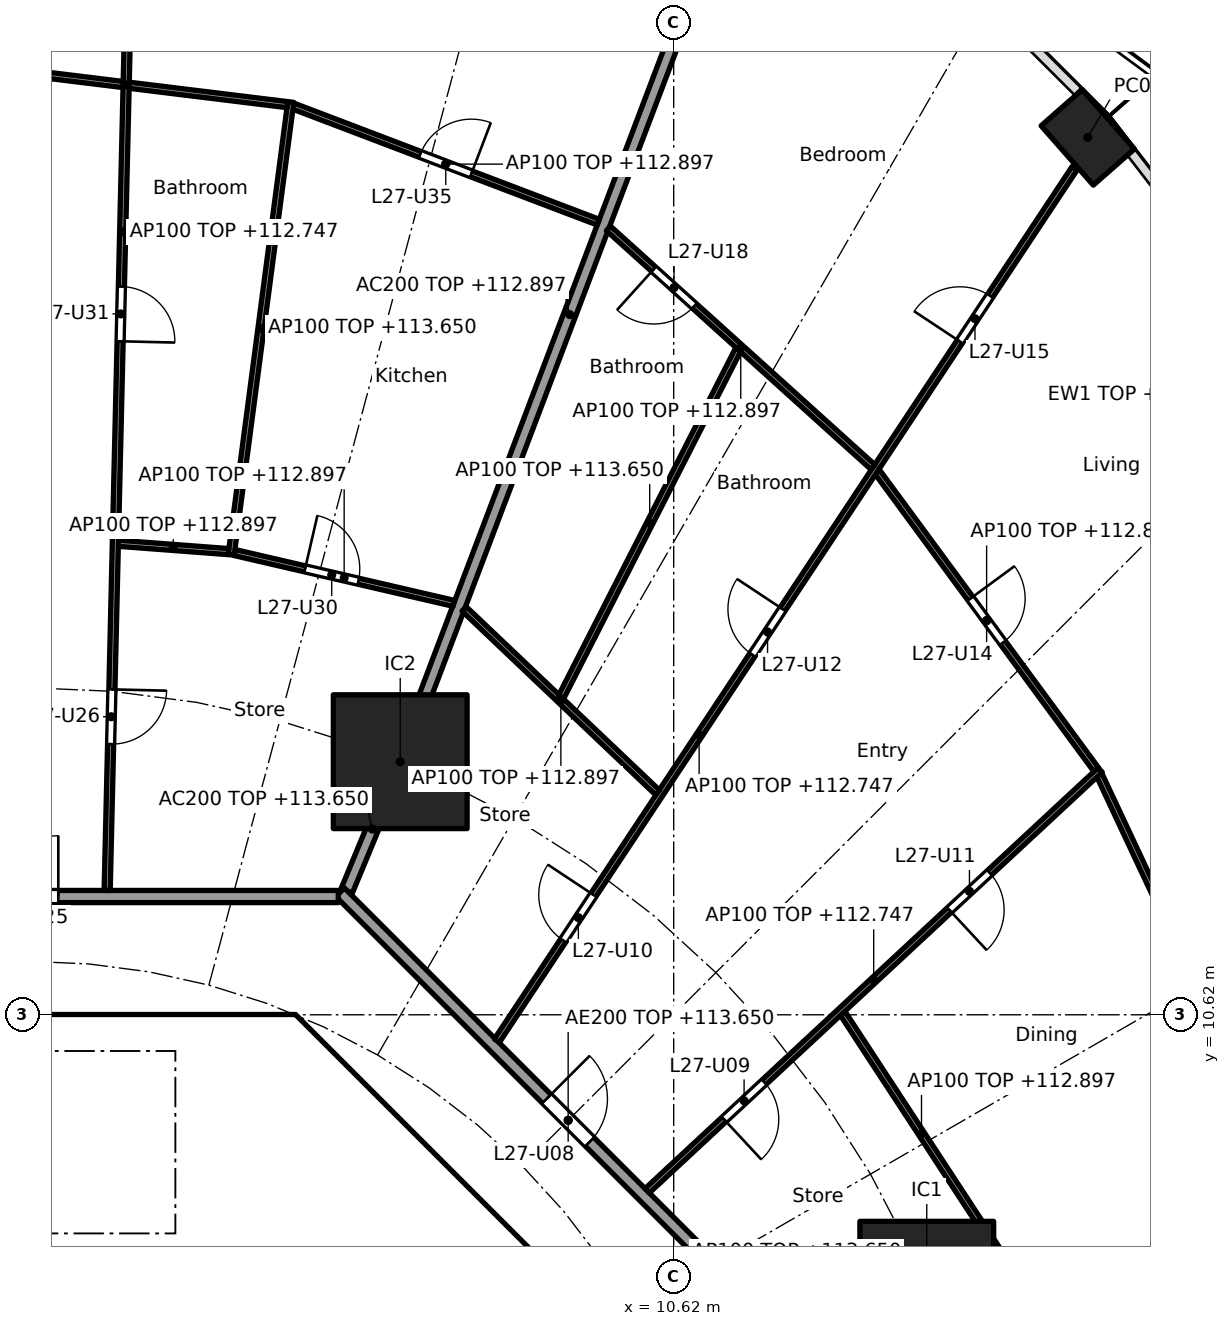
"""IFC4 building model, lengths in metres.
Left out: names, types, materials, properties, quantities, classifications, styles, units other than length and angle.
Written with IfcOpenShell. Run it as: python <this file> out.ifc"""

import sys

from ifc_helpers import new_model, si_unit, direction, frame, frame_2d, origin, origin_2d, place, context, subcontext, project, spatial, polyline, rectangle, hollow_rectangle, outline, extrude, element, fill, save


model = new_model("IFC4")
c1 = context("Model", 3, precision=1e-05, world=origin(), true_north=direction((0.0, 1.0)))
c2 = subcontext(c1, "Body", "Model", "MODEL_VIEW")
j1 = project(units=[si_unit("LENGTHUNIT", "METRE"), si_unit("PLANEANGLEUNIT", "RADIAN")], contexts=[c1])
p1 = place(None, origin())
s1 = spatial("IfcSite", under=j1, at=p1, CompositionType="ELEMENT")
p2 = place(p1, origin())
s2 = spatial("IfcBuilding", under=s1, at=p2, CompositionType="ELEMENT")
p3 = place(p2, frame((0.0, 0.0, 110.3)))
s3 = spatial("IfcBuildingStorey", under=s2, at=p3, CompositionType="ELEMENT", Elevation=110.3)
p4 = place(p3, frame((17.43, 25.049, 0.0), z_axis=(0.0, 0.0, 1.0), x_axis=(-0.660114607735, 0.751164898445, 0.0)))
e1 = element("IfcColumn", 1, at=p4, inside=s3, PredefinedType="COLUMN", context=c2, shape_type="SweptSolid", body=[
    extrude(hollow_rectangle(XDim=1.3, YDim=0.9, WallThickness=0.045, at=origin_2d()), origin(), (0.0, 0.0, 1.0), 3.7),
])
for number, where, z_axis, x_axis in (
    (2, (14.782, 6.123, 0.0), (0.0, 0.0, 1.0), (1.0, 0.0, 0.0)),
    (3, (6.123, 14.782, 0.0), (0.0, 0.0, 1.0), (1.0, 0.0, 0.0)),
):
    element("IfcColumn", number, at=place(p3, frame(where, z_axis=z_axis, x_axis=x_axis)), inside=s3, PredefinedType="COLUMN", context=c2, shape_type="SweptSolid", body=[
        extrude(rectangle(XDim=2.2, YDim=2.2, at=origin_2d()), origin(), (0.0, 0.0, 1.0), 3.7),
    ])
p5 = place(p3, frame((9.988, 4.613, 0.0), z_axis=(0.0, 0.0, 1.0), x_axis=(-0.707106781187, 0.707106781187, 0.0)))
e4 = element("IfcWall", 4, at=p5, inside=s3, PredefinedType="SHEAR", context=c2, shape_type="SweptSolid", body=[
    extrude(rectangle(XDim=7.602, YDim=0.6, at=frame_2d((3.801, 0.0))), origin(), (0.0, 0.0, 1.0), 3.35),
])
p6 = place(p5, frame((3.201, 0.0, 0.0)))
e5 = element("IfcOpeningElement", 5, at=p6, cuts=e4, PredefinedType="OPENING", context=c2, shape_type="SweptSolid", body=[
    extrude(rectangle(XDim=1.2, YDim=2.1, at=frame_2d((0.6, 1.05))), frame((0.0, 0.31, 0.0), z_axis=(0.0, -1.0, 0.0), x_axis=(1.0, 0.0, 0.0)), (0.0, 0.0, 1.0), 0.62),
])
p7 = place(p3, frame((4.0, 7.025, 0.0), z_axis=(0.0, 0.0, 1.0), x_axis=(0.0, 1.0, 0.0)))
e6 = element("IfcWall", 6, at=p7, inside=s3, PredefinedType="SOLIDWALL", context=c2, shape_type="SweptSolid", body=[
    extrude(rectangle(XDim=3.0, YDim=0.2, at=frame_2d((1.5, 0.0))), origin(), (0.0, 0.0, 1.0), 3.35),
])
p8 = place(p7, frame((0.925, 0.0, 0.0)))
e7 = element("IfcOpeningElement", 7, at=p8, cuts=e6, PredefinedType="OPENING", context=c2, shape_type="SweptSolid", body=[
    extrude(rectangle(XDim=1.1, YDim=2.1, at=frame_2d((0.55, 1.05))), frame((0.0, 0.11, 0.0), z_axis=(0.0, -1.0, 0.0), x_axis=(1.0, 0.0, 0.0)), (0.0, 0.0, 1.0), 0.22),
])
p9 = place(p3, origin())
e8 = element("IfcWall", 8, at=p9, inside=s3, PredefinedType="SHEAR", context=c2, shape_type="SweptSolid", body=[
    extrude(outline(polyline([(-4.152, 10.025), (-4.401, 9.776), (-4.825, 10.2), (-4.401, 10.625), (4.401, 10.625), (4.825, 10.2), (4.401, 9.776), (4.152, 10.025), (-4.152, 10.025)])), origin(), (0.0, 0.0, 1.0), 3.35),
])
p10 = place(p3, origin())
e9 = element("IfcWall", 9, at=p10, inside=s3, PredefinedType="SOLIDWALL", context=c2, shape_type="SweptSolid", body=[
    extrude(outline(polyline([(4.1, 6.5), (-4.1, 6.5), (-4.1, 7.025), (4.1, 7.025), (4.1, 6.5)])), origin(), (0.0, 0.0, 1.0), 3.35),
])
p11 = place(p3, frame((5.243, 12.657, 0.0), z_axis=(0.0, 0.0, 1.0), x_axis=(0.382724096228, 0.923862687939, 0.0)))
e10 = element("IfcWall", 10, at=p11, inside=s3, PredefinedType="PARTITIONING", context=c2, shape_type="SweptSolid", body=[
    extrude(rectangle(XDim=2.201, YDim=0.2, at=frame_2d((1.1, 0.0))), origin(), (0.0, 0.0, 1.0), 3.35),
])
p12 = place(p3, frame((6.141, 14.829, 0.0), z_axis=(0.0, 0.0, 1.0), x_axis=(0.354477134193, 0.935064682968, 0.0)))
e11 = element("IfcWall", 11, at=p12, inside=s3, PredefinedType="PARTITIONING", context=c2, shape_type="SweptSolid", body=[
    extrude(rectangle(XDim=15.626, YDim=0.2, at=frame_2d((7.813, 0.0))), origin(), (0.0, 0.0, 1.0), 2.597),
])
p13 = place(p3, frame((12.635, 5.134, 0.0), z_axis=(0.0, 0.0, 1.0), x_axis=(-0.707106781187, 0.707106781187, 0.0)))
e12 = element("IfcWall", 12, at=p13, inside=s3, PredefinedType="PARTITIONING", context=c2, shape_type="SweptSolid", body=[
    extrude(rectangle(XDim=10.609, YDim=0.2, at=frame_2d((5.305, 0.0))), origin(), (0.0, 0.0, 1.0), 3.35),
])
p14 = place(p13, frame((4.804, 0.0, 0.0)))
e13 = element("IfcOpeningElement", 13, at=p14, cuts=e12, PredefinedType="OPENING", context=c2, shape_type="SweptSolid", body=[
    extrude(rectangle(XDim=1.0, YDim=2.1, at=frame_2d((0.5, 1.05))), frame((0.0, 0.11, 0.0), z_axis=(0.0, -1.0, 0.0), x_axis=(1.0, 0.0, 0.0)), (0.0, 0.0, 1.0), 0.22),
])
p15 = place(p3, frame((5.104, 12.565, 0.0), z_axis=(0.0, 0.0, 1.0), x_axis=(-1.0, 0.0, 0.0)))
e14 = element("IfcWall", 14, at=p15, inside=s3, PredefinedType="PARTITIONING", context=c2, shape_type="SweptSolid", body=[
    extrude(rectangle(XDim=10.409, YDim=0.2, at=frame_2d((5.205, 0.0))), origin(), (0.0, 0.0, 1.0), 3.35),
])
p16 = place(p15, frame((4.604, 0.0, 0.0)))
e15 = element("IfcOpeningElement", 15, at=p16, cuts=e14, PredefinedType="OPENING", context=c2, shape_type="SweptSolid", body=[
    extrude(rectangle(XDim=1.0, YDim=2.1, at=frame_2d((0.5, 1.05))), frame((0.0, 0.11, 0.0), z_axis=(0.0, -1.0, 0.0), x_axis=(1.0, 0.0, 0.0)), (0.0, 0.0, 1.0), 0.22),
])
p17 = place(p3, frame((15.992, 6.68, 0.0), z_axis=(0.0, 0.0, 1.0), x_axis=(-0.547472878942, 0.836823426311, 0.0)))
e16 = element("IfcWall", 16, at=p17, inside=s3, PredefinedType="PARTITIONING", context=c2, shape_type="SweptSolid", body=[
    extrude(rectangle(XDim=4.738, YDim=0.1, at=frame_2d((2.369, 0.0))), origin(), (0.0, 0.0, 1.0), 2.597),
])
p18 = place(p3, frame((20.252, 8.95, 0.0), z_axis=(0.0, 0.0, 1.0), x_axis=(-0.424580052627, 0.90539040138, 0.0)))
e17 = element("IfcWall", 17, at=p18, inside=s3, PredefinedType="PARTITIONING", context=c2, shape_type="SweptSolid", body=[
    extrude(rectangle(XDim=6.204, YDim=0.1, at=frame_2d((3.102, 0.0))), origin(), (0.0, 0.0, 1.0), 2.597),
])
p19 = place(p3, frame((10.185, 7.726, 0.0), z_axis=(0.0, 0.0, 1.0), x_axis=(0.732598472978, 0.680661059112, 0.0)))
e18 = element("IfcWall", 18, at=p19, inside=s3, PredefinedType="PARTITIONING", context=c2, shape_type="SweptSolid", body=[
    extrude(rectangle(XDim=10.167, YDim=0.1, at=frame_2d((5.084, 0.0))), origin(), (0.0, 0.0, 1.0), 2.447),
])
p20 = place(p19, frame((1.725, 0.0, 0.0)))
e19 = element("IfcOpeningElement", 19, at=p20, cuts=e18, PredefinedType="OPENING", context=c2, shape_type="SweptSolid", body=[
    extrude(rectangle(XDim=0.9, YDim=2.1, at=frame_2d((0.45, 1.05))), frame((0.0, 0.06, 0.0), z_axis=(0.0, -1.0, 0.0), x_axis=(1.0, 0.0, 0.0)), (0.0, 0.0, 1.0), 0.12),
])
p21 = place(p19, frame((6.784, 0.0, 0.0)))
e20 = element("IfcOpeningElement", 20, at=p21, cuts=e18, PredefinedType="OPENING", context=c2, shape_type="SweptSolid", body=[
    extrude(rectangle(XDim=0.9, YDim=2.1, at=frame_2d((0.45, 1.05))), frame((0.0, 0.06, 0.0), z_axis=(0.0, -1.0, 0.0), x_axis=(1.0, 0.0, 0.0)), (0.0, 0.0, 1.0), 0.12),
])
p22 = place(p3, frame((17.567, 14.653, 0.0), z_axis=(0.0, 0.0, 1.0), x_axis=(-0.592391983588, 0.80564988536, 0.0)))
e21 = element("IfcWall", 21, at=p22, inside=s3, PredefinedType="PARTITIONING", context=c2, shape_type="SweptSolid", body=[
    extrude(rectangle(XDim=6.08, YDim=0.1, at=frame_2d((3.04, 0.0))), origin(), (0.0, 0.0, 1.0), 2.597),
])
p23 = place(p22, frame((2.59, 0.0, 0.0)))
e22 = element("IfcOpeningElement", 22, at=p23, cuts=e21, PredefinedType="OPENING", context=c2, shape_type="SweptSolid", body=[
    extrude(rectangle(XDim=0.9, YDim=2.1, at=frame_2d((0.45, 1.05))), frame((0.0, 0.06, 0.0), z_axis=(0.0, -1.0, 0.0), x_axis=(1.0, 0.0, 0.0)), (0.0, 0.0, 1.0), 0.12),
])
p24 = place(p3, frame((7.713, 10.195, 0.0), z_axis=(0.0, 0.0, 1.0), x_axis=(0.552111071171, 0.833770571015, 0.0)))
e23 = element("IfcWall", 23, at=p24, inside=s3, PredefinedType="PARTITIONING", context=c2, shape_type="SweptSolid", body=[
    extrude(rectangle(XDim=17.208, YDim=0.1, at=frame_2d((8.604, 0.0))), origin(), (0.0, 0.0, 1.0), 2.447),
])
p25 = place(p24, frame((1.976, 0.0, 0.0)))
e24 = element("IfcOpeningElement", 24, at=p25, cuts=e23, PredefinedType="OPENING", context=c2, shape_type="SweptSolid", body=[
    extrude(rectangle(XDim=0.9, YDim=2.1, at=frame_2d((0.45, 1.05))), frame((0.0, 0.06, 0.0), z_axis=(0.0, -1.0, 0.0), x_axis=(1.0, 0.0, 0.0)), (0.0, 0.0, 1.0), 0.12),
])
p26 = place(p24, frame((7.611, 0.0, 0.0)))
e25 = element("IfcOpeningElement", 25, at=p26, cuts=e23, PredefinedType="OPENING", context=c2, shape_type="SweptSolid", body=[
    extrude(rectangle(XDim=0.9, YDim=2.1, at=frame_2d((0.45, 1.05))), frame((0.0, 0.06, 0.0), z_axis=(0.0, -1.0, 0.0), x_axis=(1.0, 0.0, 0.0)), (0.0, 0.0, 1.0), 0.12),
])
p27 = place(p24, frame((13.79, 0.0, 0.0)))
e26 = element("IfcOpeningElement", 26, at=p27, cuts=e23, PredefinedType="OPENING", context=c2, shape_type="SweptSolid", body=[
    extrude(rectangle(XDim=0.9, YDim=2.1, at=frame_2d((0.45, 1.05))), frame((0.0, 0.06, 0.0), z_axis=(0.0, -1.0, 0.0), x_axis=(1.0, 0.0, 0.0)), (0.0, 0.0, 1.0), 0.12),
])
p28 = place(p3, frame((10.355, 14.274, 0.0), z_axis=(0.0, 0.0, 1.0), x_axis=(-0.725206433622, 0.688531501555, 0.0)))
e27 = element("IfcWall", 27, at=p28, inside=s3, PredefinedType="PARTITIONING", context=c2, shape_type="SweptSolid", body=[
    extrude(rectangle(XDim=4.387, YDim=0.1, at=frame_2d((2.193, 0.0))), origin(), (0.0, 0.0, 1.0), 2.597),
])
p29 = place(p3, frame((13.898, 19.625, 0.0), z_axis=(0.0, 0.0, 1.0), x_axis=(-0.742396654702, 0.669960601146, 0.0)))
e28 = element("IfcWall", 28, at=p29, inside=s3, PredefinedType="PARTITIONING", context=c2, shape_type="SweptSolid", body=[
    extrude(rectangle(XDim=5.861, YDim=0.1, at=frame_2d((2.931, 0.0))), origin(), (0.0, 0.0, 1.0), 2.597),
])
p30 = place(p29, frame((3.958, 0.0, 0.0)))
e29 = element("IfcOpeningElement", 29, at=p30, cuts=e28, PredefinedType="OPENING", context=c2, shape_type="SweptSolid", body=[
    extrude(rectangle(XDim=0.9, YDim=2.1, at=frame_2d((0.45, 1.05))), frame((0.0, 0.06, 0.0), z_axis=(0.0, -1.0, 0.0), x_axis=(1.0, 0.0, 0.0)), (0.0, 0.0, 1.0), 0.12),
])
p31 = place(p3, frame((8.769, 15.846, 0.0), z_axis=(0.0, 0.0, 1.0), x_axis=(0.454067187552, 0.890967445639, 0.0)))
e30 = element("IfcWall", 30, at=p31, inside=s3, PredefinedType="PARTITIONING", context=c2, shape_type="SweptSolid", body=[
    extrude(rectangle(XDim=6.414, YDim=0.1, at=frame_2d((3.207, 0.0))), origin(), (0.0, 0.0, 1.0), 3.35),
])
p32 = place(p3, frame((7.004, 17.386, 0.0), z_axis=(0.0, 0.0, 1.0), x_axis=(-0.974172890163, 0.22580341023, 0.0)))
e31 = element("IfcWall", 31, at=p32, inside=s3, PredefinedType="PARTITIONING", context=c2, shape_type="SweptSolid", body=[
    extrude(rectangle(XDim=3.702, YDim=0.1, at=frame_2d((1.851, 0.0))), origin(), (0.0, 0.0, 1.0), 2.597),
])
p33 = place(p32, frame((1.611, 0.0, 0.0)))
e32 = element("IfcOpeningElement", 32, at=p33, cuts=e31, PredefinedType="OPENING", context=c2, shape_type="SweptSolid", body=[
    extrude(rectangle(XDim=0.9, YDim=2.1, at=frame_2d((0.45, 1.05))), frame((0.0, 0.06, 0.0), z_axis=(0.0, -1.0, 0.0), x_axis=(1.0, 0.0, 0.0)), (0.0, 0.0, 1.0), 0.12),
])
p34 = place(p3, frame((9.379, 23.655, 0.0), z_axis=(0.0, 0.0, 1.0), x_axis=(-0.934613076136, 0.355666132653, 0.0)))
e33 = element("IfcWall", 33, at=p34, inside=s3, PredefinedType="PARTITIONING", context=c2, shape_type="SweptSolid", body=[
    extrude(rectangle(XDim=5.366, YDim=0.1, at=frame_2d((2.683, 0.0))), origin(), (0.0, 0.0, 1.0), 2.597),
])
p35 = place(p34, frame((2.233, 0.0, 0.0)))
e34 = element("IfcOpeningElement", 34, at=p35, cuts=e33, PredefinedType="OPENING", context=c2, shape_type="SweptSolid", body=[
    extrude(rectangle(XDim=0.9, YDim=2.1, at=frame_2d((0.45, 1.05))), frame((0.0, 0.06, 0.0), z_axis=(0.0, -1.0, 0.0), x_axis=(1.0, 0.0, 0.0)), (0.0, 0.0, 1.0), 0.12),
])
p36 = place(p3, frame((3.343, 18.184, 0.0), z_axis=(0.0, 0.0, 1.0), x_axis=(0.130596603503, 0.991435589009, 0.0)))
e35 = element("IfcWall", 35, at=p36, inside=s3, PredefinedType="PARTITIONING", context=c2, shape_type="SweptSolid", body=[
    extrude(rectangle(XDim=7.511, YDim=0.1, at=frame_2d((3.756, 0.0))), origin(), (0.0, 0.0, 1.0), 3.35),
])
p37 = place(p3, frame((3.299, 18.237, 0.0), z_axis=(0.0, 0.0, 1.0), x_axis=(-0.997152920483, 0.075405922664, 0.0)))
e36 = element("IfcWall", 36, at=p37, inside=s3, PredefinedType="PARTITIONING", context=c2, shape_type="SweptSolid", body=[
    extrude(rectangle(XDim=1.823, YDim=0.1, at=frame_2d((0.911, 0.0))), origin(), (0.0, 0.0, 1.0), 2.597),
])
p38 = place(p3, frame((4.267, 25.587, 0.0), z_axis=(0.0, 0.0, 1.0), x_axis=(-0.992576206119, 0.121624319302, 0.0)))
e37 = element("IfcWall", 37, at=p38, inside=s3, PredefinedType="PARTITIONING", context=c2, shape_type="SweptSolid", body=[
    extrude(rectangle(XDim=5.374, YDim=0.1, at=frame_2d((2.687, 0.0))), origin(), (0.0, 0.0, 1.0), 2.597),
])
p39 = place(p3, frame((1.303, 12.665, 0.0), z_axis=(0.0, 0.0, 1.0), x_axis=(0.023564110689, 0.999722327793, 0.0)))
e38 = element("IfcWall", 38, at=p39, inside=s3, PredefinedType="PARTITIONING", context=c2, shape_type="SweptSolid", body=[
    extrude(rectangle(XDim=21.664, YDim=0.1, at=frame_2d((10.832, 0.0))), origin(), (0.0, 0.0, 1.0), 2.447),
])
p40 = place(p39, frame((2.407, 0.0, 0.0)))
e39 = element("IfcOpeningElement", 39, at=p40, cuts=e38, PredefinedType="OPENING", context=c2, shape_type="SweptSolid", body=[
    extrude(rectangle(XDim=0.9, YDim=2.1, at=frame_2d((0.45, 1.05))), frame((0.0, 0.06, 0.0), z_axis=(0.0, -1.0, 0.0), x_axis=(1.0, 0.0, 0.0)), (0.0, 0.0, 1.0), 0.12),
])
p41 = place(p39, frame((9.034, 0.0, 0.0)))
e40 = element("IfcOpeningElement", 40, at=p41, cuts=e38, PredefinedType="OPENING", context=c2, shape_type="SweptSolid", body=[
    extrude(rectangle(XDim=0.9, YDim=2.1, at=frame_2d((0.45, 1.05))), frame((0.0, 0.06, 0.0), z_axis=(0.0, -1.0, 0.0), x_axis=(1.0, 0.0, 0.0)), (0.0, 0.0, 1.0), 0.12),
])
p42 = place(p39, frame((17.009, 0.0, 0.0)))
e41 = element("IfcOpeningElement", 41, at=p42, cuts=e38, PredefinedType="OPENING", context=c2, shape_type="SweptSolid", body=[
    extrude(rectangle(XDim=0.9, YDim=2.1, at=frame_2d((0.45, 1.05))), frame((0.0, 0.06, 0.0), z_axis=(0.0, -1.0, 0.0), x_axis=(1.0, 0.0, 0.0)), (0.0, 0.0, 1.0), 0.12),
])
p43 = place(p8, origin())
e42 = element("IfcDoor", 42, at=p43, inside=s3, OperationType="SINGLE_SWING_RIGHT", PredefinedType="DOOR", context=c2, shape_type="SweptSolid", body=[
    extrude(rectangle(XDim=1.1, YDim=2.1, at=frame_2d((0.55, 1.05))), frame((0.0, 0.025, 0.0), z_axis=(0.0, -1.0, 0.0), x_axis=(1.0, 0.0, 0.0)), (0.0, 0.0, 1.0), 0.05),
])
fill(e7, e42)
p44 = place(p6, origin())
e43 = element("IfcDoor", 43, at=p44, inside=s3, OperationType="SINGLE_SWING_RIGHT", PredefinedType="DOOR", context=c2, shape_type="SweptSolid", body=[
    extrude(rectangle(XDim=1.2, YDim=2.1, at=frame_2d((0.6, 1.05))), frame((0.0, 0.025, 0.0), z_axis=(0.0, -1.0, 0.0), x_axis=(1.0, 0.0, 0.0)), (0.0, 0.0, 1.0), 0.05),
])
fill(e5, e43)
p45 = place(p14, frame((1.0, 0.0, 0.0), x_axis=(-1.0, 0.0, 0.0)))
e44 = element("IfcDoor", 44, at=p45, inside=s3, OperationType="SINGLE_SWING_LEFT", PredefinedType="DOOR", context=c2, shape_type="SweptSolid", body=[
    extrude(rectangle(XDim=1.0, YDim=2.1, at=frame_2d((0.5, 1.05))), frame((0.0, 0.025, 0.0), z_axis=(0.0, -1.0, 0.0), x_axis=(1.0, 0.0, 0.0)), (0.0, 0.0, 1.0), 0.05),
])
fill(e13, e44)
p46 = place(p20, frame((0.9, 0.0, 0.0), x_axis=(-1.0, 0.0, 0.0)))
e45 = element("IfcDoor", 45, at=p46, inside=s3, OperationType="SINGLE_SWING_RIGHT", PredefinedType="DOOR", context=c2, shape_type="SweptSolid", body=[
    extrude(rectangle(XDim=0.9, YDim=2.1, at=frame_2d((0.45, 1.05))), frame((0.0, 0.025, 0.0), z_axis=(0.0, -1.0, 0.0), x_axis=(1.0, 0.0, 0.0)), (0.0, 0.0, 1.0), 0.05),
])
fill(e19, e45)
p47 = place(p25, origin())
e46 = element("IfcDoor", 46, at=p47, inside=s3, OperationType="SINGLE_SWING_RIGHT", PredefinedType="DOOR", context=c2, shape_type="SweptSolid", body=[
    extrude(rectangle(XDim=0.9, YDim=2.1, at=frame_2d((0.45, 1.05))), frame((0.0, 0.025, 0.0), z_axis=(0.0, -1.0, 0.0), x_axis=(1.0, 0.0, 0.0)), (0.0, 0.0, 1.0), 0.05),
])
fill(e24, e46)
p48 = place(p21, frame((0.9, 0.0, 0.0), x_axis=(-1.0, 0.0, 0.0)))
e47 = element("IfcDoor", 47, at=p48, inside=s3, OperationType="SINGLE_SWING_RIGHT", PredefinedType="DOOR", context=c2, shape_type="SweptSolid", body=[
    extrude(rectangle(XDim=0.9, YDim=2.1, at=frame_2d((0.45, 1.05))), frame((0.0, 0.025, 0.0), z_axis=(0.0, -1.0, 0.0), x_axis=(1.0, 0.0, 0.0)), (0.0, 0.0, 1.0), 0.05),
])
fill(e20, e47)
p49 = place(p26, origin())
e48 = element("IfcDoor", 48, at=p49, inside=s3, OperationType="SINGLE_SWING_RIGHT", PredefinedType="DOOR", context=c2, shape_type="SweptSolid", body=[
    extrude(rectangle(XDim=0.9, YDim=2.1, at=frame_2d((0.45, 1.05))), frame((0.0, 0.025, 0.0), z_axis=(0.0, -1.0, 0.0), x_axis=(1.0, 0.0, 0.0)), (0.0, 0.0, 1.0), 0.05),
])
fill(e25, e48)
p50 = place(p23, frame((0.9, 0.0, 0.0), x_axis=(-1.0, 0.0, 0.0)))
e49 = element("IfcDoor", 49, at=p50, inside=s3, OperationType="SINGLE_SWING_LEFT", PredefinedType="DOOR", context=c2, shape_type="SweptSolid", body=[
    extrude(rectangle(XDim=0.9, YDim=2.1, at=frame_2d((0.45, 1.05))), frame((0.0, 0.025, 0.0), z_axis=(0.0, -1.0, 0.0), x_axis=(1.0, 0.0, 0.0)), (0.0, 0.0, 1.0), 0.05),
])
fill(e22, e49)
p51 = place(p27, origin())
e50 = element("IfcDoor", 50, at=p51, inside=s3, OperationType="SINGLE_SWING_LEFT", PredefinedType="DOOR", context=c2, shape_type="SweptSolid", body=[
    extrude(rectangle(XDim=0.9, YDim=2.1, at=frame_2d((0.45, 1.05))), frame((0.0, 0.025, 0.0), z_axis=(0.0, -1.0, 0.0), x_axis=(1.0, 0.0, 0.0)), (0.0, 0.0, 1.0), 0.05),
])
fill(e26, e50)
p52 = place(p30, origin())
e51 = element("IfcDoor", 51, at=p52, inside=s3, OperationType="SINGLE_SWING_RIGHT", PredefinedType="DOOR", context=c2, shape_type="SweptSolid", body=[
    extrude(rectangle(XDim=0.9, YDim=2.1, at=frame_2d((0.45, 1.05))), frame((0.0, 0.025, 0.0), z_axis=(0.0, -1.0, 0.0), x_axis=(1.0, 0.0, 0.0)), (0.0, 0.0, 1.0), 0.05),
])
fill(e29, e51)
p53 = place(p16, frame((1.0, 0.0, 0.0), x_axis=(-1.0, 0.0, 0.0)))
e52 = element("IfcDoor", 52, at=p53, inside=s3, OperationType="SINGLE_SWING_RIGHT", PredefinedType="DOOR", context=c2, shape_type="SweptSolid", body=[
    extrude(rectangle(XDim=1.0, YDim=2.1, at=frame_2d((0.5, 1.05))), frame((0.0, 0.025, 0.0), z_axis=(0.0, -1.0, 0.0), x_axis=(1.0, 0.0, 0.0)), (0.0, 0.0, 1.0), 0.05),
])
fill(e15, e52)
p54 = place(p40, frame((0.9, 0.0, 0.0), x_axis=(-1.0, 0.0, 0.0)))
e53 = element("IfcDoor", 53, at=p54, inside=s3, OperationType="SINGLE_SWING_LEFT", PredefinedType="DOOR", context=c2, shape_type="SweptSolid", body=[
    extrude(rectangle(XDim=0.9, YDim=2.1, at=frame_2d((0.45, 1.05))), frame((0.0, 0.025, 0.0), z_axis=(0.0, -1.0, 0.0), x_axis=(1.0, 0.0, 0.0)), (0.0, 0.0, 1.0), 0.05),
])
fill(e39, e53)
p55 = place(p33, frame((0.9, 0.0, 0.0), x_axis=(-1.0, 0.0, 0.0)))
e54 = element("IfcDoor", 54, at=p55, inside=s3, OperationType="SINGLE_SWING_LEFT", PredefinedType="DOOR", context=c2, shape_type="SweptSolid", body=[
    extrude(rectangle(XDim=0.9, YDim=2.1, at=frame_2d((0.45, 1.05))), frame((0.0, 0.025, 0.0), z_axis=(0.0, -1.0, 0.0), x_axis=(1.0, 0.0, 0.0)), (0.0, 0.0, 1.0), 0.05),
])
fill(e32, e54)
p56 = place(p41, frame((0.9, 0.0, 0.0), x_axis=(-1.0, 0.0, 0.0)))
e55 = element("IfcDoor", 55, at=p56, inside=s3, OperationType="SINGLE_SWING_RIGHT", PredefinedType="DOOR", context=c2, shape_type="SweptSolid", body=[
    extrude(rectangle(XDim=0.9, YDim=2.1, at=frame_2d((0.45, 1.05))), frame((0.0, 0.025, 0.0), z_axis=(0.0, -1.0, 0.0), x_axis=(1.0, 0.0, 0.0)), (0.0, 0.0, 1.0), 0.05),
])
fill(e40, e55)
p57 = place(p35, frame((0.9, 0.0, 0.0), x_axis=(-1.0, 0.0, 0.0)))
e56 = element("IfcDoor", 56, at=p57, inside=s3, OperationType="SINGLE_SWING_RIGHT", PredefinedType="DOOR", context=c2, shape_type="SweptSolid", body=[
    extrude(rectangle(XDim=0.9, YDim=2.1, at=frame_2d((0.45, 1.05))), frame((0.0, 0.025, 0.0), z_axis=(0.0, -1.0, 0.0), x_axis=(1.0, 0.0, 0.0)), (0.0, 0.0, 1.0), 0.05),
])
fill(e34, e56)
save(model, sys.argv[1])
